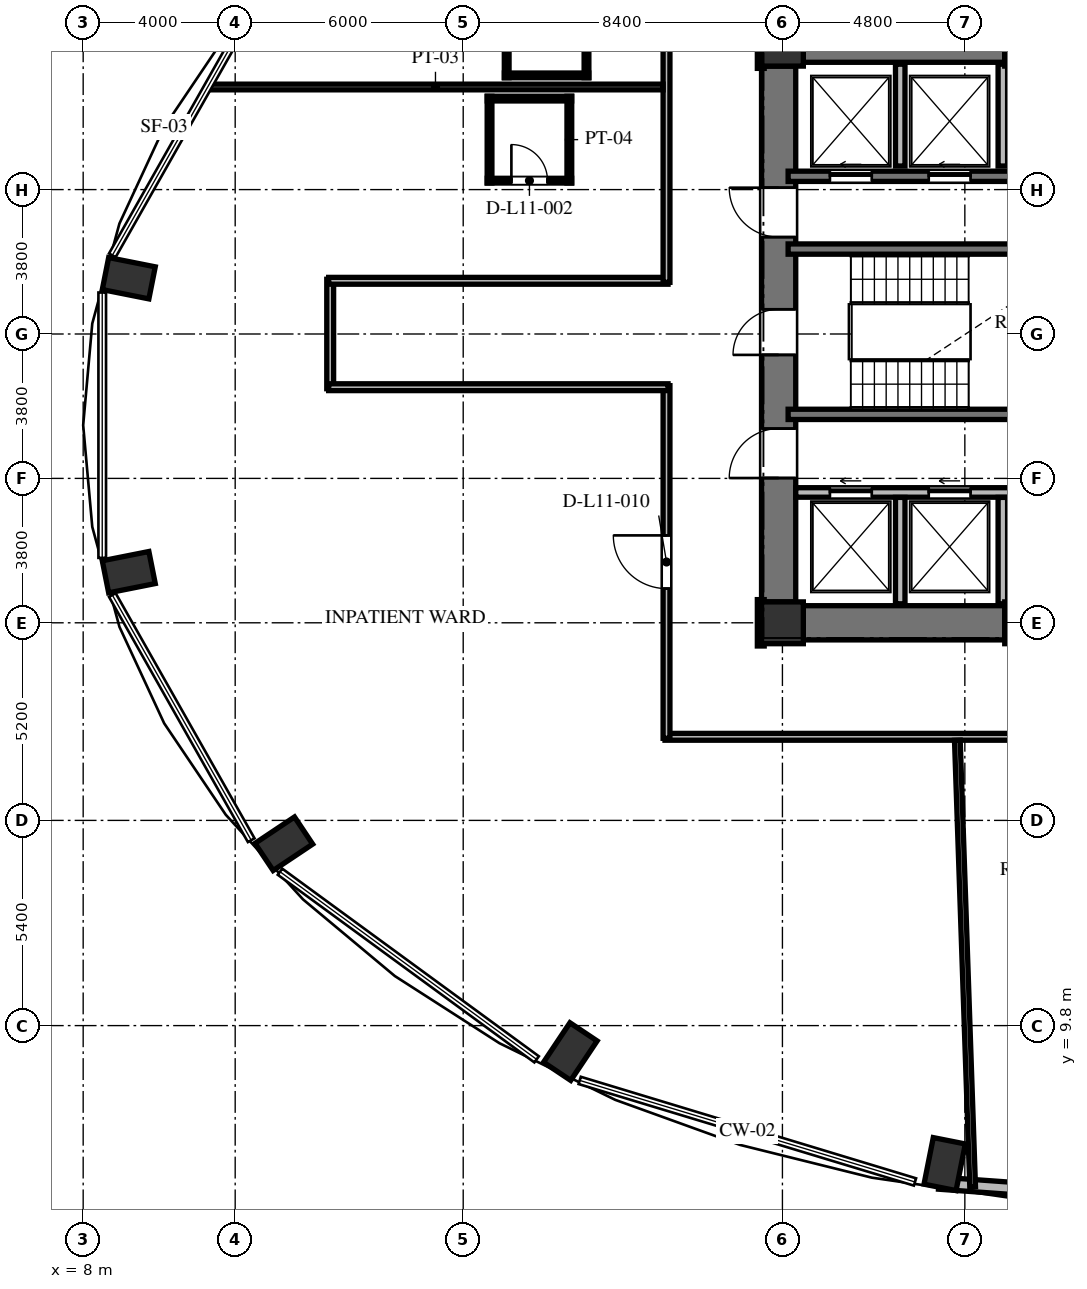
"""IFC4 building model, lengths in metres.
Left out: names, types, materials, properties, quantities, classifications, styles, units other than length and angle.
Written with IfcOpenShell. Run it as: python <this file> out.ifc"""

import sys

from ifc_helpers import new_model, si_unit, direction, frame, frame_2d, origin, origin_2d, place, context, subcontext, project, spatial, rectangle, extrude, element, fill, save


model = new_model("IFC4")
c1 = context("Model", 3, precision=1e-05, world=origin(), true_north=direction((0.0, 1.0)))
c2 = subcontext(c1, "Body", "Model", "MODEL_VIEW")
j1 = project(units=[si_unit("LENGTHUNIT", "METRE"), si_unit("PLANEANGLEUNIT", "RADIAN")], contexts=[c1])
p1 = place(None, origin())
s1 = spatial("IfcSite", under=j1, at=p1, CompositionType="ELEMENT")
p2 = place(p1, origin())
s2 = spatial("IfcBuilding", under=s1, at=p2, CompositionType="ELEMENT")
p3 = place(p2, frame((0.0, 0.0, 47.088)))
s3 = spatial("IfcBuildingStorey", under=s2, at=p3, CompositionType="ELEMENT", Elevation=47.088)
for number, where, z_axis, x_axis in (
    (1, (9.2, 29.468, 0.0), (0.0, 0.0, 1.0), (-0.981, 0.195, 0.0)),
    (2, (9.2, 21.732, 0.0), (0.0, 0.0, 1.0), (-0.981, -0.195, 0.0)),
    (3, (13.28, 14.586, 0.0), (0.0, 0.0, 1.0), (-0.831, -0.556, 0.0)),
    (4, (20.819, 9.116, 0.0), (0.0, 0.0, 1.0), (-0.556, -0.831, 0.0)),
    (5, (30.669, 6.156, 0.0), (0.0, 0.0, 1.0), (-0.195, -0.981, 0.0)),
):
    element("IfcColumn", number, at=place(p3, frame(where, z_axis=z_axis, x_axis=x_axis)), inside=s3, PredefinedType="COLUMN", context=c2, shape_type="SweptSolid", body=[
        extrude(rectangle(XDim=1.25, YDim=0.86, at=origin_2d()), origin(), (0.0, 0.0, 1.0), 3.648),
    ])
for number, where, z_axis, x_axis in (
    (6, (26.4, 20.4, 0.0), (0.0, 0.0, 1.0), (1.0, 0.0, 0.0)),
    (7, (32.8, 20.4, 0.0), (0.0, 0.0, 1.0), (1.0, 0.0, 0.0)),
    (8, (32.8, 35.6, 0.0), (0.0, 0.0, 1.0), (1.0, 0.0, 0.0)),
    (9, (26.4, 35.6, 0.0), (0.0, 0.0, 1.0), (1.0, 0.0, 0.0)),
):
    element("IfcColumn", number, at=place(p3, frame(where, z_axis=z_axis, x_axis=x_axis)), inside=s3, PredefinedType="COLUMN", context=c2, shape_type="SweptSolid", body=[
        extrude(rectangle(XDim=1.1, YDim=1.1, at=origin_2d()), origin(), (0.0, 0.0, 1.0), 3.648),
    ])
p4 = place(p3, frame((26.3, 20.95, 0.0), z_axis=(0.0, 0.0, 1.0), x_axis=(0.0, 1.0, 0.0)))
e10 = element("IfcWall", 10, at=p4, inside=s3, PredefinedType="SHEAR", context=c2, shape_type="SweptSolid", body=[
    extrude(rectangle(XDim=14.1, YDim=0.9, at=frame_2d((7.05, 0.0))), origin(), (0.0, 0.0, 1.0), 3.648),
])
p5 = place(p4, frame((6.5, 0.0, 0.0)))
e11 = element("IfcOpeningElement", 11, at=p5, cuts=e10, PredefinedType="OPENING", context=c2, shape_type="SweptSolid", body=[
    extrude(rectangle(XDim=1.2, YDim=2.15, at=frame_2d((0.6, 1.075))), frame((0.0, 0.46, 0.0), z_axis=(0.0, -1.0, 0.0), x_axis=(1.0, 0.0, 0.0)), (0.0, 0.0, 1.0), 0.92),
])
p6 = place(p4, frame((9.6, 0.0, 0.0)))
e12 = element("IfcOpeningElement", 12, at=p6, cuts=e10, PredefinedType="OPENING", context=c2, shape_type="SweptSolid", body=[
    extrude(rectangle(XDim=1.3, YDim=2.2, at=frame_2d((0.65, 1.1))), frame((0.0, 0.46, 0.0), z_axis=(0.0, -1.0, 0.0), x_axis=(1.0, 0.0, 0.0)), (0.0, 0.0, 1.0), 0.92),
])
p7 = place(p4, frame((3.26, 0.0, 0.0)))
e13 = element("IfcOpeningElement", 13, at=p7, cuts=e10, PredefinedType="OPENING", context=c2, shape_type="SweptSolid", body=[
    extrude(rectangle(XDim=1.3, YDim=2.2, at=frame_2d((0.65, 1.1))), frame((0.0, 0.46, 0.0), z_axis=(0.0, -1.0, 0.0), x_axis=(1.0, 0.0, 0.0)), (0.0, 0.0, 1.0), 0.92),
])
for number, where, z_axis, x_axis in (
    (14, (26.95, 20.4, 0.0), (0.0, 0.0, 1.0), (1.0, 0.0, 0.0)),
    (15, (26.95, 35.6, 0.0), (0.0, 0.0, 1.0), (1.0, 0.0, 0.0)),
):
    element("IfcWall", number, at=place(p3, frame(where, z_axis=z_axis, x_axis=x_axis)), inside=s3, PredefinedType="SHEAR", context=c2, shape_type="SweptSolid", body=[
        extrude(rectangle(XDim=5.3, YDim=0.9, at=frame_2d((2.65, 0.0))), origin(), (0.0, 0.0, 1.0), 3.648),
    ])
p8 = place(p3, frame((30.519, 5.654, 0.0), z_axis=(0.0, 0.0, 1.0), x_axis=(0.997421878774, -0.071760683825, 0.0)))
e16 = element("IfcWall", 16, at=p8, inside=s3, PredefinedType="SOLIDWALL", context=c2, shape_type="SweptSolid", body=[
    extrude(rectangle(XDim=5.675, YDim=0.32, at=frame_2d((2.837, 0.0))), origin(), (0.0, 0.0, 1.0), 3.428),
])
p9 = place(p8, frame((2.237, 0.0, 0.85)))
e17 = element("IfcOpeningElement", 17, at=p9, cuts=e16, PredefinedType="OPENING", context=c2, shape_type="SweptSolid", body=[
    extrude(rectangle(XDim=1.2, YDim=2.2, at=frame_2d((0.6, 1.1))), frame((0.0, 0.17, 0.0), z_axis=(0.0, -1.0, 0.0), x_axis=(1.0, 0.0, 0.0)), (0.0, 0.0, 1.0), 0.34),
])
for number, where, z_axis, x_axis in (
    (18, (26.55, 30.235, 0.0), (0.0, 0.0, 1.0), (1.0, 0.0, 0.0)),
    (19, (26.55, 25.885, 0.0), (0.0, 0.0, 1.0), (1.0, 0.0, 0.0)),
):
    element("IfcWall", number, at=place(p3, frame(where, z_axis=z_axis, x_axis=x_axis)), inside=s3, PredefinedType="SHEAR", context=c2, shape_type="SweptSolid", body=[
        extrude(rectangle(XDim=7.985, YDim=0.27, at=frame_2d((3.992, 0.0))), origin(), (0.0, 0.0, 1.0), 3.648),
    ])
p10 = place(p3, frame((26.55, 32.15, 0.0), z_axis=(0.0, 0.0, 1.0), x_axis=(1.0, 0.0, 0.0)))
e20 = element("IfcWall", 20, at=p10, inside=s3, PredefinedType="SHEAR", context=c2, shape_type="SweptSolid", body=[
    extrude(rectangle(XDim=16.4, YDim=0.27, at=frame_2d((8.2, 0.0))), origin(), (0.0, 0.0, 1.0), 3.648),
])
p11 = place(p10, frame((1.1, 0.0, 0.0)))
e21 = element("IfcOpeningElement", 21, at=p11, cuts=e20, PredefinedType="OPENING", context=c2, shape_type="SweptSolid", body=[
    extrude(rectangle(XDim=1.1, YDim=2.2, at=frame_2d((0.55, 1.1))), frame((0.0, 0.145, 0.0), z_axis=(0.0, -1.0, 0.0), x_axis=(1.0, 0.0, 0.0)), (0.0, 0.0, 1.0), 0.29),
])
p12 = place(p10, frame((3.7, 0.0, 0.0)))
e22 = element("IfcOpeningElement", 22, at=p12, cuts=e20, PredefinedType="OPENING", context=c2, shape_type="SweptSolid", body=[
    extrude(rectangle(XDim=1.1, YDim=2.2, at=frame_2d((0.55, 1.1))), frame((0.0, 0.145, 0.0), z_axis=(0.0, -1.0, 0.0), x_axis=(1.0, 0.0, 0.0)), (0.0, 0.0, 1.0), 0.29),
])
p13 = place(p10, frame((6.5, 0.0, 0.0)))
e23 = element("IfcOpeningElement", 23, at=p13, cuts=e20, PredefinedType="OPENING", context=c2, shape_type="SweptSolid", body=[
    extrude(rectangle(XDim=1.1, YDim=2.2, at=frame_2d((0.55, 1.1))), frame((0.0, 0.145, 0.0), z_axis=(0.0, -1.0, 0.0), x_axis=(1.0, 0.0, 0.0)), (0.0, 0.0, 1.0), 0.29),
])
p14 = place(p10, frame((9.1, 0.0, 0.0)))
e24 = element("IfcOpeningElement", 24, at=p14, cuts=e20, PredefinedType="OPENING", context=c2, shape_type="SweptSolid", body=[
    extrude(rectangle(XDim=1.1, YDim=2.2, at=frame_2d((0.55, 1.1))), frame((0.0, 0.145, 0.0), z_axis=(0.0, -1.0, 0.0), x_axis=(1.0, 0.0, 0.0)), (0.0, 0.0, 1.0), 0.29),
])
p15 = place(p10, frame((11.9, 0.0, 0.0)))
e25 = element("IfcOpeningElement", 25, at=p15, cuts=e20, PredefinedType="OPENING", context=c2, shape_type="SweptSolid", body=[
    extrude(rectangle(XDim=1.1, YDim=2.2, at=frame_2d((0.55, 1.1))), frame((0.0, 0.145, 0.0), z_axis=(0.0, -1.0, 0.0), x_axis=(1.0, 0.0, 0.0)), (0.0, 0.0, 1.0), 0.29),
])
p16 = place(p10, frame((14.5, 0.0, 0.0)))
e26 = element("IfcOpeningElement", 26, at=p16, cuts=e20, PredefinedType="OPENING", context=c2, shape_type="SweptSolid", body=[
    extrude(rectangle(XDim=1.1, YDim=2.2, at=frame_2d((0.55, 1.1))), frame((0.0, 0.145, 0.0), z_axis=(0.0, -1.0, 0.0), x_axis=(1.0, 0.0, 0.0)), (0.0, 0.0, 1.0), 0.29),
])
p17 = place(p3, frame((26.75, 23.83, 0.0), z_axis=(0.0, 0.0, 1.0), x_axis=(1.0, 0.0, 0.0)))
e27 = element("IfcWall", 27, at=p17, inside=s3, PredefinedType="SOLIDWALL", context=c2, shape_type="SweptSolid", body=[
    extrude(rectangle(XDim=16.2, YDim=0.25, at=frame_2d((8.1, 0.0))), origin(), (0.0, 0.0, 1.0), 3.428),
])
p18 = place(p17, frame((0.9, 0.0, 0.0)))
e28 = element("IfcOpeningElement", 28, at=p18, cuts=e27, PredefinedType="OPENING", context=c2, shape_type="SweptSolid", body=[
    extrude(rectangle(XDim=1.1, YDim=2.2, at=frame_2d((0.55, 1.1))), frame((0.0, 0.135, 0.0), z_axis=(0.0, -1.0, 0.0), x_axis=(1.0, 0.0, 0.0)), (0.0, 0.0, 1.0), 0.27),
])
p19 = place(p17, frame((3.5, 0.0, 0.0)))
e29 = element("IfcOpeningElement", 29, at=p19, cuts=e27, PredefinedType="OPENING", context=c2, shape_type="SweptSolid", body=[
    extrude(rectangle(XDim=1.1, YDim=2.2, at=frame_2d((0.55, 1.1))), frame((0.0, 0.135, 0.0), z_axis=(0.0, -1.0, 0.0), x_axis=(1.0, 0.0, 0.0)), (0.0, 0.0, 1.0), 0.27),
])
p20 = place(p17, frame((6.3, 0.0, 0.0)))
e30 = element("IfcOpeningElement", 30, at=p20, cuts=e27, PredefinedType="OPENING", context=c2, shape_type="SweptSolid", body=[
    extrude(rectangle(XDim=1.1, YDim=2.2, at=frame_2d((0.55, 1.1))), frame((0.0, 0.135, 0.0), z_axis=(0.0, -1.0, 0.0), x_axis=(1.0, 0.0, 0.0)), (0.0, 0.0, 1.0), 0.27),
])
p21 = place(p17, frame((8.9, 0.0, 0.0)))
e31 = element("IfcOpeningElement", 31, at=p21, cuts=e27, PredefinedType="OPENING", context=c2, shape_type="SweptSolid", body=[
    extrude(rectangle(XDim=1.1, YDim=2.2, at=frame_2d((0.55, 1.1))), frame((0.0, 0.135, 0.0), z_axis=(0.0, -1.0, 0.0), x_axis=(1.0, 0.0, 0.0)), (0.0, 0.0, 1.0), 0.27),
])
p22 = place(p17, frame((11.7, 0.0, 0.0)))
e32 = element("IfcOpeningElement", 32, at=p22, cuts=e27, PredefinedType="OPENING", context=c2, shape_type="SweptSolid", body=[
    extrude(rectangle(XDim=1.1, YDim=2.2, at=frame_2d((0.55, 1.1))), frame((0.0, 0.135, 0.0), z_axis=(0.0, -1.0, 0.0), x_axis=(1.0, 0.0, 0.0)), (0.0, 0.0, 1.0), 0.27),
])
p23 = place(p17, frame((14.15, 0.0, 0.0)))
e33 = element("IfcOpeningElement", 33, at=p23, cuts=e27, PredefinedType="OPENING", context=c2, shape_type="SweptSolid", body=[
    extrude(rectangle(XDim=1.4, YDim=2.3, at=frame_2d((0.7, 1.15))), frame((0.0, 0.135, 0.0), z_axis=(0.0, -1.0, 0.0), x_axis=(1.0, 0.0, 0.0)), (0.0, 0.0, 1.0), 0.27),
])
p24 = place(p3, frame((29.5, 32.42, 0.0), z_axis=(0.0, 0.0, 1.0), x_axis=(0.0, 1.0, 0.0)))
e34 = element("IfcWall", 34, at=p24, inside=s3, PredefinedType="SOLIDWALL", context=c2, shape_type="SweptSolid", body=[
    extrude(rectangle(XDim=2.68, YDim=0.25, at=frame_2d((1.34, 0.0))), origin(), (0.0, 0.0, 1.0), 3.428),
])
p25 = place(p3, frame((29.5, 20.9, 0.0), z_axis=(0.0, 0.0, 1.0), x_axis=(0.0, 1.0, 0.0)))
e35 = element("IfcWall", 35, at=p25, inside=s3, PredefinedType="SOLIDWALL", context=c2, shape_type="SweptSolid", body=[
    extrude(rectangle(XDim=2.8, YDim=0.25, at=frame_2d((1.4, 0.0))), origin(), (0.0, 0.0, 1.0), 3.428),
])
p26 = place(p3, frame((32.2, 32.42, 0.0), z_axis=(0.0, 0.0, 1.0), x_axis=(0.0, 1.0, 0.0)))
e36 = element("IfcWall", 36, at=p26, inside=s3, PredefinedType="SOLIDWALL", context=c2, shape_type="SweptSolid", body=[
    extrude(rectangle(XDim=2.68, YDim=0.25, at=frame_2d((1.34, 0.0))), origin(), (0.0, 0.0, 1.0), 3.428),
])
p27 = place(p3, frame((32.2, 20.9, 0.0), z_axis=(0.0, 0.0, 1.0), x_axis=(0.0, 1.0, 0.0)))
e37 = element("IfcWall", 37, at=p27, inside=s3, PredefinedType="SOLIDWALL", context=c2, shape_type="SweptSolid", body=[
    extrude(rectangle(XDim=2.8, YDim=0.25, at=frame_2d((1.4, 0.0))), origin(), (0.0, 0.0, 1.0), 3.428),
])
p28 = place(p3, frame((14.5, 26.56, 0.0), z_axis=(0.0, 0.0, 1.0), x_axis=(0.0, 1.0, 0.0)))
e38 = element("IfcWall", 38, at=p28, inside=s3, PredefinedType="PARTITIONING", context=c2, shape_type="SweptSolid", body=[
    extrude(rectangle(XDim=2.88, YDim=0.18, at=frame_2d((1.44, 0.0))), origin(), (0.0, 0.0, 1.0), 3.428),
])
p29 = place(p3, frame((14.46, 29.4, 0.0), z_axis=(0.0, 0.0, 1.0), x_axis=(1.0, 0.0, 0.0)))
e39 = element("IfcWall", 39, at=p29, inside=s3, PredefinedType="PARTITIONING", context=c2, shape_type="SweptSolid", body=[
    extrude(rectangle(XDim=8.93, YDim=0.18, at=frame_2d((4.465, 0.0))), origin(), (0.0, 0.0, 1.0), 3.428),
])
p30 = place(p3, frame((23.35, 29.36, 0.0), z_axis=(0.0, 0.0, 1.0), x_axis=(0.0, 1.0, 0.0)))
e40 = element("IfcWall", 40, at=p30, inside=s3, PredefinedType="PARTITIONING", context=c2, shape_type="SweptSolid", body=[
    extrude(rectangle(XDim=9.43, YDim=0.18, at=frame_2d((4.715, 0.0))), origin(), (0.0, 0.0, 1.0), 3.428),
])
for number, where, z_axis, x_axis in (
    (41, (25.83, 36.21, 0.0), (0.0, 0.0, 1.0), (0.0, -1.0, 0.0)),
    (42, (25.83, 21.01, 0.0), (0.0, 0.0, 1.0), (0.0, -1.0, 0.0)),
):
    element("IfcWall", number, at=place(p3, frame(where, z_axis=z_axis, x_axis=x_axis)), inside=s3, PredefinedType="PARTITIONING", context=c2, shape_type="SweptSolid", body=[
        extrude(rectangle(XDim=1.22, YDim=0.18, at=frame_2d((0.61, 0.0))), origin(), (0.0, 0.0, 1.0), 3.428),
    ])
p31 = place(p3, frame((45.24, 17.4, 0.0), z_axis=(0.0, 0.0, 1.0), x_axis=(-1.0, 0.0, 0.0)))
e43 = element("IfcWall", 43, at=p31, inside=s3, PredefinedType="PARTITIONING", context=c2, shape_type="SweptSolid", body=[
    extrude(rectangle(XDim=21.93, YDim=0.18, at=frame_2d((10.965, 0.0))), origin(), (0.0, 0.0, 1.0), 3.053),
])
p32 = place(p31, frame((9.289, 0.0, 0.0)))
e44 = element("IfcOpeningElement", 44, at=p32, cuts=e43, PredefinedType="OPENING", context=c2, shape_type="SweptSolid", body=[
    extrude(rectangle(XDim=1.4, YDim=2.2, at=frame_2d((0.7, 1.1))), frame((0.0, 0.1, 0.0), z_axis=(0.0, -1.0, 0.0), x_axis=(1.0, 0.0, 0.0)), (0.0, 0.0, 1.0), 0.2),
])
p33 = place(p31, frame((2.329, 0.0, 0.0)))
e45 = element("IfcOpeningElement", 45, at=p33, cuts=e43, PredefinedType="OPENING", context=c2, shape_type="SweptSolid", body=[
    extrude(rectangle(XDim=1.4, YDim=2.2, at=frame_2d((0.7, 1.1))), frame((0.0, 0.1, 0.0), z_axis=(0.0, -1.0, 0.0), x_axis=(1.0, 0.0, 0.0)), (0.0, 0.0, 1.0), 0.2),
])
p34 = place(p3, frame((23.35, 17.36, 0.0), z_axis=(0.0, 0.0, 1.0), x_axis=(0.0, 1.0, 0.0)))
e46 = element("IfcWall", 46, at=p34, inside=s3, PredefinedType="PARTITIONING", context=c2, shape_type="SweptSolid", body=[
    extrude(rectangle(XDim=9.28, YDim=0.18, at=frame_2d((4.64, 0.0))), origin(), (0.0, 0.0, 1.0), 3.428),
])
p35 = place(p34, frame((3.94, 0.0, 0.0)))
e47 = element("IfcOpeningElement", 47, at=p35, cuts=e46, PredefinedType="OPENING", context=c2, shape_type="SweptSolid", body=[
    extrude(rectangle(XDim=1.4, YDim=2.2, at=frame_2d((0.7, 1.1))), frame((0.0, 0.1, 0.0), z_axis=(0.0, -1.0, 0.0), x_axis=(1.0, 0.0, 0.0)), (0.0, 0.0, 1.0), 0.2),
])
p36 = place(p3, frame((23.39, 26.6, 0.0), z_axis=(0.0, 0.0, 1.0), x_axis=(-1.0, 0.0, 0.0)))
e48 = element("IfcWall", 48, at=p36, inside=s3, PredefinedType="PARTITIONING", context=c2, shape_type="SweptSolid", body=[
    extrude(rectangle(XDim=8.93, YDim=0.18, at=frame_2d((4.465, 0.0))), origin(), (0.0, 0.0, 1.0), 3.428),
])
p37 = place(p3, frame((11.281, 34.5, 0.0), z_axis=(0.0, 0.0, 1.0), x_axis=(1.0, 0.0, 0.0)))
e49 = element("IfcWall", 49, at=p37, inside=s3, PredefinedType="PARTITIONING", context=c2, shape_type="SweptSolid", body=[
    extrude(rectangle(XDim=11.979, YDim=0.15, at=frame_2d((5.99, 0.0))), origin(), (0.0, 0.0, 1.0), 3.428),
])
p38 = place(p3, frame((31.405, 5.559, 0.0), z_axis=(0.0, 0.0, 1.0), x_axis=(-0.034219123574, 0.9994143543, 0.0)))
e50 = element("IfcWall", 50, at=p38, inside=s3, PredefinedType="PARTITIONING", context=c2, shape_type="SweptSolid", body=[
    extrude(rectangle(XDim=11.758, YDim=0.15, at=frame_2d((5.879, 0.0))), origin(), (0.0, 0.0, 1.0), 2.813),
])
p39 = place(p3, frame((18.633, 34.195, 0.0), z_axis=(0.0, 0.0, 1.0), x_axis=(1.0, 0.0, 0.0)))
e51 = element("IfcWall", 51, at=p39, inside=s3, PredefinedType="PARTITIONING", context=c2, shape_type="SweptSolid", body=[
    extrude(rectangle(XDim=2.22, YDim=0.125, at=frame_2d((1.11, 0.0))), origin(), (0.0, 0.0, 1.0), 3.428),
])
p40 = place(p3, frame((18.633, 32.035, 0.0), z_axis=(0.0, 0.0, 1.0), x_axis=(1.0, 0.0, 0.0)))
e52 = element("IfcWall", 52, at=p40, inside=s3, PredefinedType="PARTITIONING", context=c2, shape_type="SweptSolid", body=[
    extrude(rectangle(XDim=2.22, YDim=0.125, at=frame_2d((1.11, 0.0))), origin(), (0.0, 0.0, 1.0), 3.428),
])
p41 = place(p40, frame((0.635, 0.0, 0.0)))
e53 = element("IfcOpeningElement", 53, at=p41, cuts=e52, PredefinedType="OPENING", context=c2, shape_type="SweptSolid", body=[
    extrude(rectangle(XDim=0.95, YDim=2.1, at=frame_2d((0.475, 1.05))), frame((0.0, 0.073, 0.0), z_axis=(0.0, -1.0, 0.0), x_axis=(1.0, 0.0, 0.0)), (0.0, 0.0, 1.0), 0.145),
])
for number, where, z_axis, x_axis in (
    (54, (20.793, 31.975, 0.0), (0.0, 0.0, 1.0), (0.0, 1.0, 0.0)),
    (55, (18.693, 31.975, 0.0), (0.0, 0.0, 1.0), (0.0, 1.0, 0.0)),
):
    element("IfcWall", number, at=place(p3, frame(where, z_axis=z_axis, x_axis=x_axis)), inside=s3, PredefinedType="PARTITIONING", context=c2, shape_type="SweptSolid", body=[
        extrude(rectangle(XDim=2.28, YDim=0.125, at=frame_2d((1.14, 0.0))), origin(), (0.0, 0.0, 1.0), 3.428),
    ])
p42 = place(p3, frame((19.084, 34.805, 0.0), z_axis=(0.0, 0.0, 1.0), x_axis=(1.0, 0.0, 0.0)))
e56 = element("IfcWall", 56, at=p42, inside=s3, PredefinedType="PARTITIONING", context=c2, shape_type="SweptSolid", body=[
    extrude(rectangle(XDim=2.22, YDim=0.125, at=frame_2d((1.11, 0.0))), origin(), (0.0, 0.0, 1.0), 3.428),
])
for number, where, z_axis, x_axis in (
    (57, (21.244, 34.745, 0.0), (0.0, 0.0, 1.0), (0.0, 1.0, 0.0)),
    (58, (19.144, 34.745, 0.0), (0.0, 0.0, 1.0), (0.0, 1.0, 0.0)),
):
    element("IfcWall", number, at=place(p3, frame(where, z_axis=z_axis, x_axis=x_axis)), inside=s3, PredefinedType="PARTITIONING", context=c2, shape_type="SweptSolid", body=[
        extrude(rectangle(XDim=2.28, YDim=0.125, at=frame_2d((1.14, 0.0))), origin(), (0.0, 0.0, 1.0), 3.428),
    ])
p43 = place(p5, origin())
e59 = element("IfcDoor", 59, at=p43, inside=s3, OperationType="SINGLE_SWING_LEFT", PredefinedType="DOOR", context=c2, shape_type="SweptSolid", body=[
    extrude(rectangle(XDim=1.2, YDim=2.15, at=frame_2d((0.6, 1.075))), frame((0.0, 0.025, 0.0), z_axis=(0.0, -1.0, 0.0), x_axis=(1.0, 0.0, 0.0)), (0.0, 0.0, 1.0), 0.05),
])
fill(e11, e59)
p44 = place(p6, origin())
e60 = element("IfcDoor", 60, at=p44, inside=s3, OperationType="SINGLE_SWING_RIGHT", PredefinedType="DOOR", context=c2, shape_type="SweptSolid", body=[
    extrude(rectangle(XDim=1.3, YDim=2.2, at=frame_2d((0.65, 1.1))), frame((0.0, 0.025, 0.0), z_axis=(0.0, -1.0, 0.0), x_axis=(1.0, 0.0, 0.0)), (0.0, 0.0, 1.0), 0.05),
])
fill(e12, e60)
p45 = place(p7, origin())
e61 = element("IfcDoor", 61, at=p45, inside=s3, OperationType="SINGLE_SWING_LEFT", PredefinedType="DOOR", context=c2, shape_type="SweptSolid", body=[
    extrude(rectangle(XDim=1.3, YDim=2.2, at=frame_2d((0.65, 1.1))), frame((0.0, 0.025, 0.0), z_axis=(0.0, -1.0, 0.0), x_axis=(1.0, 0.0, 0.0)), (0.0, 0.0, 1.0), 0.05),
])
fill(e13, e61)
p46 = place(p11, origin())
e62 = element("IfcDoor", 62, at=p46, inside=s3, OperationType="SLIDING_TO_LEFT", PredefinedType="DOOR", context=c2, shape_type="SweptSolid", body=[
    extrude(rectangle(XDim=1.1, YDim=2.2, at=frame_2d((0.55, 1.1))), frame((0.0, 0.025, 0.0), z_axis=(0.0, -1.0, 0.0), x_axis=(1.0, 0.0, 0.0)), (0.0, 0.0, 1.0), 0.05),
])
fill(e21, e62)
p47 = place(p12, origin())
e63 = element("IfcDoor", 63, at=p47, inside=s3, OperationType="SLIDING_TO_LEFT", PredefinedType="DOOR", context=c2, shape_type="SweptSolid", body=[
    extrude(rectangle(XDim=1.1, YDim=2.2, at=frame_2d((0.55, 1.1))), frame((0.0, 0.025, 0.0), z_axis=(0.0, -1.0, 0.0), x_axis=(1.0, 0.0, 0.0)), (0.0, 0.0, 1.0), 0.05),
])
fill(e22, e63)
p48 = place(p18, origin())
e64 = element("IfcDoor", 64, at=p48, inside=s3, OperationType="SLIDING_TO_LEFT", PredefinedType="DOOR", context=c2, shape_type="SweptSolid", body=[
    extrude(rectangle(XDim=1.1, YDim=2.2, at=frame_2d((0.55, 1.1))), frame((0.0, 0.025, 0.0), z_axis=(0.0, -1.0, 0.0), x_axis=(1.0, 0.0, 0.0)), (0.0, 0.0, 1.0), 0.05),
])
fill(e28, e64)
p49 = place(p19, origin())
e65 = element("IfcDoor", 65, at=p49, inside=s3, OperationType="SLIDING_TO_LEFT", PredefinedType="DOOR", context=c2, shape_type="SweptSolid", body=[
    extrude(rectangle(XDim=1.1, YDim=2.2, at=frame_2d((0.55, 1.1))), frame((0.0, 0.025, 0.0), z_axis=(0.0, -1.0, 0.0), x_axis=(1.0, 0.0, 0.0)), (0.0, 0.0, 1.0), 0.05),
])
fill(e29, e65)
p50 = place(p41, origin())
e66 = element("IfcDoor", 66, at=p50, inside=s3, OperationType="SINGLE_SWING_LEFT", PredefinedType="DOOR", context=c2, shape_type="SweptSolid", body=[
    extrude(rectangle(XDim=0.95, YDim=2.1, at=frame_2d((0.475, 1.05))), frame((0.0, 0.025, 0.0), z_axis=(0.0, -1.0, 0.0), x_axis=(1.0, 0.0, 0.0)), (0.0, 0.0, 1.0), 0.05),
])
fill(e53, e66)
p51 = place(p35, origin())
e67 = element("IfcDoor", 67, at=p51, inside=s3, OperationType="SINGLE_SWING_RIGHT", PredefinedType="DOOR", context=c2, shape_type="SweptSolid", body=[
    extrude(rectangle(XDim=1.4, YDim=2.2, at=frame_2d((0.7, 1.1))), frame((0.0, 0.025, 0.0), z_axis=(0.0, -1.0, 0.0), x_axis=(1.0, 0.0, 0.0)), (0.0, 0.0, 1.0), 0.05),
])
fill(e47, e67)
save(model, sys.argv[1])
